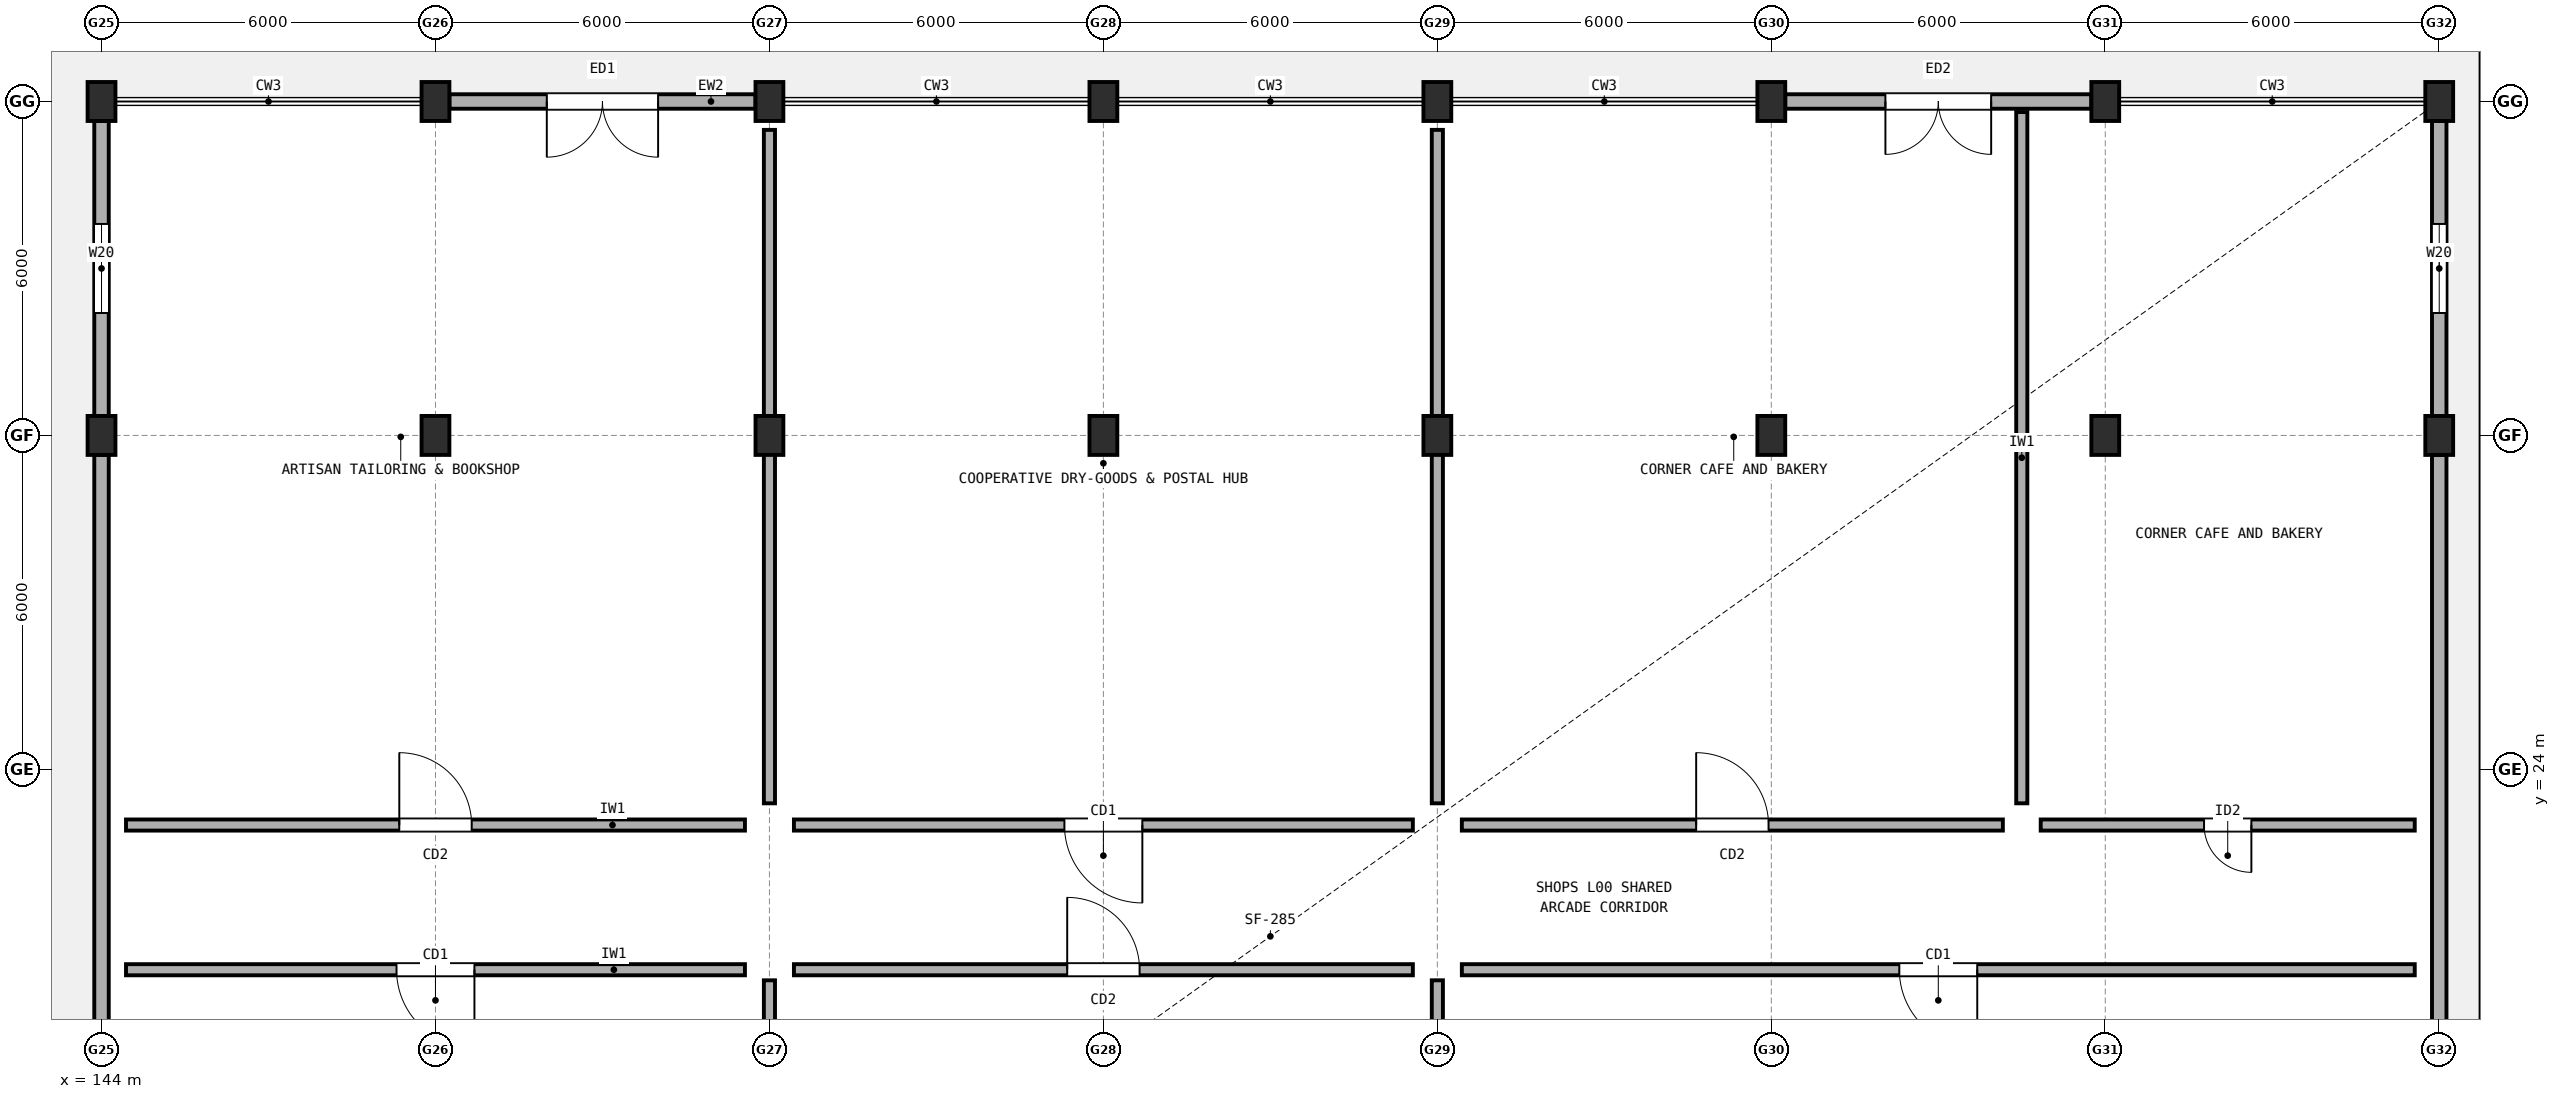
"""IFC4 building model, lengths in metres.
Left out: names, types, materials, properties, quantities, classifications, styles, units other than length and angle.
Written with IfcOpenShell. Run it as: python <this file> out.ifc"""

import sys

from ifc_helpers import new_model, si_unit, direction, frame, frame_2d, origin, origin_2d, place, context, subcontext, project, spatial, rectangle, extrude, element, fill, save


model = new_model("IFC4")
c1 = context("Model", 3, precision=1e-05, world=origin(), true_north=direction((0.0, 1.0)))
c2 = subcontext(c1, "Body", "Model", "MODEL_VIEW")
j1 = project(units=[si_unit("LENGTHUNIT", "METRE"), si_unit("PLANEANGLEUNIT", "RADIAN")], contexts=[c1])
p1 = place(None, origin())
s1 = spatial("IfcSite", under=j1, at=p1, CompositionType="ELEMENT")
p2 = place(p1, origin())
s2 = spatial("IfcBuilding", under=s1, at=p2, CompositionType="ELEMENT")
p3 = place(p2, origin())
s3 = spatial("IfcBuildingStorey", under=s2, at=p3, CompositionType="ELEMENT", Elevation=0.0)
for number, where, z_axis, x_axis in (
    (1, (144.0, 30.0, 0.0), (0.0, 0.0, 1.0), (1.0, 0.0, 0.0)),
    (2, (144.0, 36.0, 0.0), (0.0, 0.0, 1.0), (1.0, 0.0, 0.0)),
    (3, (150.0, 30.0, 0.0), (0.0, 0.0, 1.0), (1.0, 0.0, 0.0)),
    (4, (150.0, 36.0, 0.0), (0.0, 0.0, 1.0), (1.0, 0.0, 0.0)),
    (5, (156.0, 30.0, 0.0), (0.0, 0.0, 1.0), (1.0, 0.0, 0.0)),
    (6, (156.0, 36.0, 0.0), (0.0, 0.0, 1.0), (1.0, 0.0, 0.0)),
    (7, (162.0, 30.0, 0.0), (0.0, 0.0, 1.0), (1.0, 0.0, 0.0)),
    (8, (162.0, 36.0, 0.0), (0.0, 0.0, 1.0), (1.0, 0.0, 0.0)),
    (9, (168.0, 30.0, 0.0), (0.0, 0.0, 1.0), (1.0, 0.0, 0.0)),
    (10, (168.0, 36.0, 0.0), (0.0, 0.0, 1.0), (1.0, 0.0, 0.0)),
    (11, (174.0, 30.0, 0.0), (0.0, 0.0, 1.0), (1.0, 0.0, 0.0)),
    (12, (174.0, 36.0, 0.0), (0.0, 0.0, 1.0), (1.0, 0.0, 0.0)),
    (13, (180.0, 30.0, 0.0), (0.0, 0.0, 1.0), (1.0, 0.0, 0.0)),
    (14, (180.0, 36.0, 0.0), (0.0, 0.0, 1.0), (1.0, 0.0, 0.0)),
    (15, (186.0, 30.0, 0.0), (0.0, 0.0, 1.0), (1.0, 0.0, 0.0)),
    (16, (186.0, 36.0, 0.0), (0.0, 0.0, 1.0), (1.0, 0.0, 0.0)),
):
    element("IfcColumn", number, at=place(p3, frame(where, z_axis=z_axis, x_axis=x_axis)), inside=s3, PredefinedType="COLUMN", context=c2, shape_type="SweptSolid", body=[
        extrude(rectangle(XDim=0.5, YDim=0.7, at=origin_2d()), origin(), (0.0, 0.0, 1.0), 4.23),
    ])
p4 = place(p3, frame((155.75, 36.0, 0.0), z_axis=(0.0, 0.0, 1.0), x_axis=(-1.0, 0.0, 0.0)))
e17 = element("IfcWall", 17, at=p4, inside=s3, PredefinedType="STANDARD", context=c2, shape_type="SweptSolid", body=[
    extrude(rectangle(XDim=5.5, YDim=0.26, at=frame_2d((2.75, 0.0))), origin(), (0.0, 0.0, 1.0), 3.112),
])
p5 = place(p4, frame((1.75, 0.0, 0.0)))
e18 = element("IfcOpeningElement", 18, at=p5, cuts=e17, PredefinedType="OPENING", context=c2, shape_type="SweptSolid", body=[
    extrude(rectangle(XDim=2.0, YDim=2.25, at=frame_2d((1.0, 1.125))), frame((0.0, 0.14, 0.0), z_axis=(0.0, -1.0, 0.0), x_axis=(1.0, 0.0, 0.0)), (0.0, 0.0, 1.0), 0.28),
])
p6 = place(p3, frame((179.75, 36.0, 0.0), z_axis=(0.0, 0.0, 1.0), x_axis=(-1.0, 0.0, 0.0)))
e19 = element("IfcWall", 19, at=p6, inside=s3, PredefinedType="STANDARD", context=c2, shape_type="SweptSolid", body=[
    extrude(rectangle(XDim=5.5, YDim=0.26, at=frame_2d((2.75, 0.0))), origin(), (0.0, 0.0, 1.0), 3.112),
])
p7 = place(p6, frame((1.8, 0.0, 0.0)))
e20 = element("IfcOpeningElement", 20, at=p7, cuts=e19, PredefinedType="OPENING", context=c2, shape_type="SweptSolid", body=[
    extrude(rectangle(XDim=1.9, YDim=2.25, at=frame_2d((0.95, 1.125))), frame((0.0, 0.14, 0.0), z_axis=(0.0, -1.0, 0.0), x_axis=(1.0, 0.0, 0.0)), (0.0, 0.0, 1.0), 0.28),
])
for number, where, z_axis, x_axis in (
    (21, (144.0, 29.65, 0.0), (0.0, 0.0, 1.0), (0.0, -1.0, 0.0)),
    (22, (186.0, 18.35, 0.0), (0.0, 0.0, 1.0), (0.0, 1.0, 0.0)),
):
    element("IfcWall", number, at=place(p3, frame(where, z_axis=z_axis, x_axis=x_axis)), inside=s3, PredefinedType="STANDARD", context=c2, shape_type="SweptSolid", body=[
        extrude(rectangle(XDim=11.3, YDim=0.26, at=frame_2d((5.65, 0.0))), origin(), (0.0, 0.0, 1.0), 2.912),
    ])
p8 = place(p3, frame((144.0, 35.65, 0.0), z_axis=(0.0, 0.0, 1.0), x_axis=(0.0, -1.0, 0.0)))
e23 = element("IfcWall", 23, at=p8, inside=s3, PredefinedType="STANDARD", context=c2, shape_type="SweptSolid", body=[
    extrude(rectangle(XDim=5.3, YDim=0.26, at=frame_2d((2.65, 0.0))), origin(), (0.0, 0.0, 1.0), 3.612),
])
p9 = place(p8, frame((1.85, 0.0, 0.85)))
e24 = element("IfcOpeningElement", 24, at=p9, cuts=e23, PredefinedType="OPENING", context=c2, shape_type="SweptSolid", body=[
    extrude(rectangle(XDim=1.6, YDim=1.5, at=frame_2d((0.8, 0.75))), frame((0.0, 0.14, 0.0), z_axis=(0.0, -1.0, 0.0), x_axis=(1.0, 0.0, 0.0)), (0.0, 0.0, 1.0), 0.28),
])
p10 = place(p3, frame((186.0, 30.35, 0.0), z_axis=(0.0, 0.0, 1.0), x_axis=(0.0, 1.0, 0.0)))
e25 = element("IfcWall", 25, at=p10, inside=s3, PredefinedType="STANDARD", context=c2, shape_type="SweptSolid", body=[
    extrude(rectangle(XDim=5.3, YDim=0.26, at=frame_2d((2.65, 0.0))), origin(), (0.0, 0.0, 1.0), 3.712),
])
p11 = place(p10, frame((1.85, 0.0, 0.85)))
e26 = element("IfcOpeningElement", 26, at=p11, cuts=e25, PredefinedType="OPENING", context=c2, shape_type="SweptSolid", body=[
    extrude(rectangle(XDim=1.6, YDim=1.5, at=frame_2d((0.8, 0.75))), frame((0.0, 0.14, 0.0), z_axis=(0.0, -1.0, 0.0), x_axis=(1.0, 0.0, 0.0)), (0.0, 0.0, 1.0), 0.28),
])
p12 = place(p3, frame((144.44, 20.4, 0.0), z_axis=(0.0, 0.0, 1.0), x_axis=(1.0, 0.0, 0.0)))
e27 = element("IfcWall", 27, at=p12, inside=s3, PredefinedType="SOLIDWALL", context=c2, shape_type="SweptSolid", body=[
    extrude(rectangle(XDim=11.12, YDim=0.2, at=frame_2d((5.56, 0.0))), origin(), (0.0, 0.0, 1.0), 2.912),
])
p13 = place(p12, frame((4.86, 0.0, 0.0)))
e28 = element("IfcOpeningElement", 28, at=p13, cuts=e27, PredefinedType="OPENING", context=c2, shape_type="SweptSolid", body=[
    extrude(rectangle(XDim=1.4, YDim=2.15, at=frame_2d((0.7, 1.075))), frame((0.0, 0.11, 0.0), z_axis=(0.0, -1.0, 0.0), x_axis=(1.0, 0.0, 0.0)), (0.0, 0.0, 1.0), 0.22),
])
p14 = place(p3, frame((156.0, 6.39, 0.0), z_axis=(0.0, 0.0, 1.0), x_axis=(0.0, 1.0, 0.0)))
e29 = element("IfcWall", 29, at=p14, inside=s3, PredefinedType="SOLIDWALL", context=c2, shape_type="SweptSolid", body=[
    extrude(rectangle(XDim=13.82, YDim=0.2, at=frame_2d((6.91, 0.0))), origin(), (0.0, 0.0, 1.0), 2.912),
])
p15 = place(p3, frame((156.44, 20.4, 0.0), z_axis=(0.0, 0.0, 1.0), x_axis=(1.0, 0.0, 0.0)))
e30 = element("IfcWall", 30, at=p15, inside=s3, PredefinedType="SOLIDWALL", context=c2, shape_type="SweptSolid", body=[
    extrude(rectangle(XDim=11.12, YDim=0.2, at=frame_2d((5.56, 0.0))), origin(), (0.0, 0.0, 1.0), 2.912),
])
p16 = place(p15, frame((4.91, 0.0, 0.0)))
e31 = element("IfcOpeningElement", 31, at=p16, cuts=e30, PredefinedType="OPENING", context=c2, shape_type="SweptSolid", body=[
    extrude(rectangle(XDim=1.3, YDim=2.15, at=frame_2d((0.65, 1.075))), frame((0.0, 0.11, 0.0), z_axis=(0.0, -1.0, 0.0), x_axis=(1.0, 0.0, 0.0)), (0.0, 0.0, 1.0), 0.22),
])
p17 = place(p3, frame((168.0, 6.39, 0.0), z_axis=(0.0, 0.0, 1.0), x_axis=(0.0, 1.0, 0.0)))
e32 = element("IfcWall", 32, at=p17, inside=s3, PredefinedType="SOLIDWALL", context=c2, shape_type="SweptSolid", body=[
    extrude(rectangle(XDim=13.82, YDim=0.2, at=frame_2d((6.91, 0.0))), origin(), (0.0, 0.0, 1.0), 2.912),
])
p18 = place(p3, frame((168.44, 20.4, 0.0), z_axis=(0.0, 0.0, 1.0), x_axis=(1.0, 0.0, 0.0)))
e33 = element("IfcWall", 33, at=p18, inside=s3, PredefinedType="SOLIDWALL", context=c2, shape_type="SweptSolid", body=[
    extrude(rectangle(XDim=17.12, YDim=0.2, at=frame_2d((8.56, 0.0))), origin(), (0.0, 0.0, 1.0), 2.912),
])
p19 = place(p18, frame((7.86, 0.0, 0.0)))
e34 = element("IfcOpeningElement", 34, at=p19, cuts=e33, PredefinedType="OPENING", context=c2, shape_type="SweptSolid", body=[
    extrude(rectangle(XDim=1.4, YDim=2.15, at=frame_2d((0.7, 1.075))), frame((0.0, 0.11, 0.0), z_axis=(0.0, -1.0, 0.0), x_axis=(1.0, 0.0, 0.0)), (0.0, 0.0, 1.0), 0.22),
])
p20 = place(p3, frame((144.44, 23.0, 0.0), z_axis=(0.0, 0.0, 1.0), x_axis=(1.0, 0.0, 0.0)))
e35 = element("IfcWall", 35, at=p20, inside=s3, PredefinedType="SOLIDWALL", context=c2, shape_type="SweptSolid", body=[
    extrude(rectangle(XDim=11.12, YDim=0.2, at=frame_2d((5.56, 0.0))), origin(), (0.0, 0.0, 1.0), 2.912),
])
p21 = place(p20, frame((4.91, 0.0, 0.0)))
e36 = element("IfcOpeningElement", 36, at=p21, cuts=e35, PredefinedType="OPENING", context=c2, shape_type="SweptSolid", body=[
    extrude(rectangle(XDim=1.3, YDim=2.15, at=frame_2d((0.65, 1.075))), frame((0.0, 0.11, 0.0), z_axis=(0.0, -1.0, 0.0), x_axis=(1.0, 0.0, 0.0)), (0.0, 0.0, 1.0), 0.22),
])
p22 = place(p3, frame((156.0, 23.39, 0.0), z_axis=(0.0, 0.0, 1.0), x_axis=(0.0, 1.0, 0.0)))
e37 = element("IfcWall", 37, at=p22, inside=s3, PredefinedType="SOLIDWALL", context=c2, shape_type="SweptSolid", body=[
    extrude(rectangle(XDim=12.1, YDim=0.2, at=frame_2d((6.05, 0.0))), origin(), (0.0, 0.0, 1.0), 2.912),
])
p23 = place(p3, frame((156.44, 23.0, 0.0), z_axis=(0.0, 0.0, 1.0), x_axis=(1.0, 0.0, 0.0)))
e38 = element("IfcWall", 38, at=p23, inside=s3, PredefinedType="SOLIDWALL", context=c2, shape_type="SweptSolid", body=[
    extrude(rectangle(XDim=11.12, YDim=0.2, at=frame_2d((5.56, 0.0))), origin(), (0.0, 0.0, 1.0), 2.912),
])
p24 = place(p23, frame((4.86, 0.0, 0.0)))
e39 = element("IfcOpeningElement", 39, at=p24, cuts=e38, PredefinedType="OPENING", context=c2, shape_type="SweptSolid", body=[
    extrude(rectangle(XDim=1.4, YDim=2.15, at=frame_2d((0.7, 1.075))), frame((0.0, 0.11, 0.0), z_axis=(0.0, -1.0, 0.0), x_axis=(1.0, 0.0, 0.0)), (0.0, 0.0, 1.0), 0.22),
])
p25 = place(p3, frame((168.0, 23.39, 0.0), z_axis=(0.0, 0.0, 1.0), x_axis=(0.0, 1.0, 0.0)))
e40 = element("IfcWall", 40, at=p25, inside=s3, PredefinedType="SOLIDWALL", context=c2, shape_type="SweptSolid", body=[
    extrude(rectangle(XDim=12.1, YDim=0.2, at=frame_2d((6.05, 0.0))), origin(), (0.0, 0.0, 1.0), 2.912),
])
p26 = place(p3, frame((168.44, 23.0, 0.0), z_axis=(0.0, 0.0, 1.0), x_axis=(1.0, 0.0, 0.0)))
e41 = element("IfcWall", 41, at=p26, inside=s3, PredefinedType="SOLIDWALL", context=c2, shape_type="SweptSolid", body=[
    extrude(rectangle(XDim=9.72, YDim=0.2, at=frame_2d((4.86, 0.0))), origin(), (0.0, 0.0, 1.0), 2.912),
])
p27 = place(p26, frame((4.21, 0.0, 0.0)))
e42 = element("IfcOpeningElement", 42, at=p27, cuts=e41, PredefinedType="OPENING", context=c2, shape_type="SweptSolid", body=[
    extrude(rectangle(XDim=1.3, YDim=2.15, at=frame_2d((0.65, 1.075))), frame((0.0, 0.11, 0.0), z_axis=(0.0, -1.0, 0.0), x_axis=(1.0, 0.0, 0.0)), (0.0, 0.0, 1.0), 0.22),
])
p28 = place(p3, frame((178.5, 23.39, 0.0), z_axis=(0.0, 0.0, 1.0), x_axis=(0.0, 1.0, 0.0)))
e43 = element("IfcWall", 43, at=p28, inside=s3, PredefinedType="SOLIDWALL", context=c2, shape_type="SweptSolid", body=[
    extrude(rectangle(XDim=12.42, YDim=0.2, at=frame_2d((6.21, 0.0))), origin(), (0.0, 0.0, 1.0), 3.112),
])
p29 = place(p3, frame((178.84, 23.0, 0.0), z_axis=(0.0, 0.0, 1.0), x_axis=(1.0, 0.0, 0.0)))
e44 = element("IfcWall", 44, at=p29, inside=s3, PredefinedType="SOLIDWALL", context=c2, shape_type="SweptSolid", body=[
    extrude(rectangle(XDim=6.72, YDim=0.2, at=frame_2d((3.36, 0.0))), origin(), (0.0, 0.0, 1.0), 2.912),
])
p30 = place(p29, frame((2.935, 0.0, 0.0)))
e45 = element("IfcOpeningElement", 45, at=p30, cuts=e44, PredefinedType="OPENING", context=c2, shape_type="SweptSolid", body=[
    extrude(rectangle(XDim=0.85, YDim=2.1, at=frame_2d((0.425, 1.05))), frame((0.0, 0.11, 0.0), z_axis=(0.0, -1.0, 0.0), x_axis=(1.0, 0.0, 0.0)), (0.0, 0.0, 1.0), 0.22),
])
p31 = place(p5, frame((2.0, 0.0, 0.0), z_axis=(0.0, 0.0, 1.0), x_axis=(-1.0, 0.0, 0.0)))
e46 = element("IfcDoor", 46, at=p31, inside=s3, OperationType="DOUBLE_DOOR_SINGLE_SWING", PredefinedType="DOOR", context=c2, shape_type="SweptSolid", body=[
    extrude(rectangle(XDim=2.0, YDim=2.25, at=frame_2d((1.0, 1.125))), frame((0.0, 0.025, 0.0), z_axis=(0.0, -1.0, 0.0), x_axis=(1.0, 0.0, 0.0)), (0.0, 0.0, 1.0), 0.05),
])
fill(e18, e46)
p32 = place(p7, frame((1.9, 0.0, 0.0), z_axis=(0.0, 0.0, 1.0), x_axis=(-1.0, 0.0, 0.0)))
e47 = element("IfcDoor", 47, at=p32, inside=s3, OperationType="DOUBLE_DOOR_SINGLE_SWING", PredefinedType="DOOR", context=c2, shape_type="SweptSolid", body=[
    extrude(rectangle(XDim=1.9, YDim=2.25, at=frame_2d((0.95, 1.125))), frame((0.0, 0.025, 0.0), z_axis=(0.0, -1.0, 0.0), x_axis=(1.0, 0.0, 0.0)), (0.0, 0.0, 1.0), 0.05),
])
fill(e20, e47)
p33 = place(p9, origin())
e48 = element("IfcWindow", 48, at=p33, inside=s3, PartitioningType="SINGLE_PANEL", PredefinedType="WINDOW", context=c2, shape_type="SweptSolid", body=[
    extrude(rectangle(XDim=1.6, YDim=1.5, at=frame_2d((0.8, 0.75))), frame((0.0, 0.03, 0.0), z_axis=(0.0, -1.0, 0.0), x_axis=(1.0, 0.0, 0.0)), (0.0, 0.0, 1.0), 0.06),
])
fill(e24, e48)
p34 = place(p11, origin())
e49 = element("IfcWindow", 49, at=p34, inside=s3, PartitioningType="SINGLE_PANEL", PredefinedType="WINDOW", context=c2, shape_type="SweptSolid", body=[
    extrude(rectangle(XDim=1.6, YDim=1.5, at=frame_2d((0.8, 0.75))), frame((0.0, 0.03, 0.0), z_axis=(0.0, -1.0, 0.0), x_axis=(1.0, 0.0, 0.0)), (0.0, 0.0, 1.0), 0.06),
])
fill(e26, e49)
p35 = place(p13, origin())
e50 = element("IfcDoor", 50, at=p35, inside=s3, OperationType="SINGLE_SWING_RIGHT", PredefinedType="DOOR", context=c2, shape_type="SweptSolid", body=[
    extrude(rectangle(XDim=1.4, YDim=2.15, at=frame_2d((0.7, 1.075))), frame((0.0, 0.025, 0.0), z_axis=(0.0, -1.0, 0.0), x_axis=(1.0, 0.0, 0.0)), (0.0, 0.0, 1.0), 0.05),
])
fill(e28, e50)
p36 = place(p16, origin())
e51 = element("IfcDoor", 51, at=p36, inside=s3, OperationType="SINGLE_SWING_LEFT", PredefinedType="DOOR", context=c2, shape_type="SweptSolid", body=[
    extrude(rectangle(XDim=1.3, YDim=2.15, at=frame_2d((0.65, 1.075))), frame((0.0, 0.025, 0.0), z_axis=(0.0, -1.0, 0.0), x_axis=(1.0, 0.0, 0.0)), (0.0, 0.0, 1.0), 0.05),
])
fill(e31, e51)
p37 = place(p19, origin())
e52 = element("IfcDoor", 52, at=p37, inside=s3, OperationType="SINGLE_SWING_RIGHT", PredefinedType="DOOR", context=c2, shape_type="SweptSolid", body=[
    extrude(rectangle(XDim=1.4, YDim=2.15, at=frame_2d((0.7, 1.075))), frame((0.0, 0.025, 0.0), z_axis=(0.0, -1.0, 0.0), x_axis=(1.0, 0.0, 0.0)), (0.0, 0.0, 1.0), 0.05),
])
fill(e34, e52)
p38 = place(p21, origin())
e53 = element("IfcDoor", 53, at=p38, inside=s3, OperationType="SINGLE_SWING_LEFT", PredefinedType="DOOR", context=c2, shape_type="SweptSolid", body=[
    extrude(rectangle(XDim=1.3, YDim=2.15, at=frame_2d((0.65, 1.075))), frame((0.0, 0.025, 0.0), z_axis=(0.0, -1.0, 0.0), x_axis=(1.0, 0.0, 0.0)), (0.0, 0.0, 1.0), 0.05),
])
fill(e36, e53)
p39 = place(p24, origin())
e54 = element("IfcDoor", 54, at=p39, inside=s3, OperationType="SINGLE_SWING_RIGHT", PredefinedType="DOOR", context=c2, shape_type="SweptSolid", body=[
    extrude(rectangle(XDim=1.4, YDim=2.15, at=frame_2d((0.7, 1.075))), frame((0.0, 0.025, 0.0), z_axis=(0.0, -1.0, 0.0), x_axis=(1.0, 0.0, 0.0)), (0.0, 0.0, 1.0), 0.05),
])
fill(e39, e54)
p40 = place(p27, origin())
e55 = element("IfcDoor", 55, at=p40, inside=s3, OperationType="SINGLE_SWING_LEFT", PredefinedType="DOOR", context=c2, shape_type="SweptSolid", body=[
    extrude(rectangle(XDim=1.3, YDim=2.15, at=frame_2d((0.65, 1.075))), frame((0.0, 0.025, 0.0), z_axis=(0.0, -1.0, 0.0), x_axis=(1.0, 0.0, 0.0)), (0.0, 0.0, 1.0), 0.05),
])
fill(e42, e55)
p41 = place(p30, origin())
e56 = element("IfcDoor", 56, at=p41, inside=s3, OperationType="SINGLE_SWING_RIGHT", PredefinedType="DOOR", context=c2, shape_type="SweptSolid", body=[
    extrude(rectangle(XDim=0.85, YDim=2.1, at=frame_2d((0.425, 1.05))), frame((0.0, 0.025, 0.0), z_axis=(0.0, -1.0, 0.0), x_axis=(1.0, 0.0, 0.0)), (0.0, 0.0, 1.0), 0.05),
])
fill(e45, e56)
save(model, sys.argv[1])
